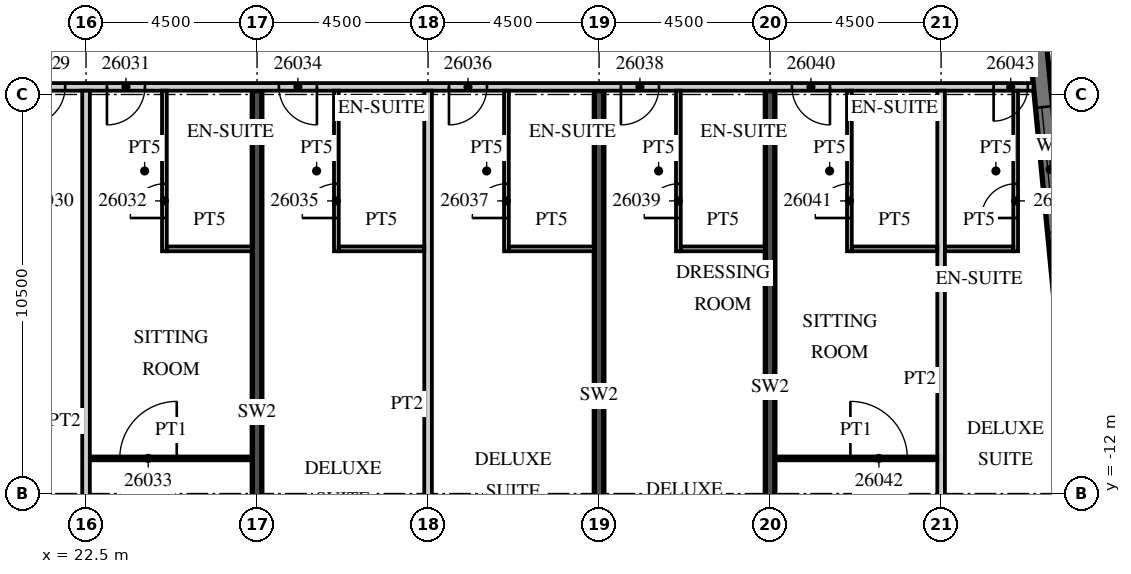
"""IFC4 building model, lengths in metres.
Left out: names, types, materials, properties, quantities, classifications, styles, units other than length and angle.
Written with IfcOpenShell. Run it as: python <this file> out.ifc"""

import sys

from ifc_helpers import new_model, si_unit, direction, frame, frame_2d, origin, place, context, subcontext, project, spatial, rectangle, extrude, element, fill, save


model = new_model("IFC4")
c1 = context("Model", 3, precision=1e-05, world=origin(), true_north=direction((0.0, 1.0)))
c2 = subcontext(c1, "Body", "Model", "MODEL_VIEW")
j1 = project(units=[si_unit("LENGTHUNIT", "METRE"), si_unit("PLANEANGLEUNIT", "RADIAN")], contexts=[c1])
p1 = place(None, origin())
s1 = spatial("IfcSite", under=j1, at=p1, CompositionType="ELEMENT")
p2 = place(p1, origin())
s2 = spatial("IfcBuilding", under=s1, at=p2, CompositionType="ELEMENT")
p3 = place(p2, frame((0.0, 0.0, 120.7)))
s3 = spatial("IfcBuildingStorey", under=s2, at=p3, CompositionType="ELEMENT", Elevation=120.7)
p4 = place(p3, frame((27.0, -18.311, 0.0), z_axis=(0.0, 0.0, 1.0), x_axis=(0.0, 1.0, 0.0)))
e1 = element("IfcWall", 1, at=p4, inside=s3, PredefinedType="SHEAR", context=c2, shape_type="SweptSolid", body=[
    extrude(rectangle(XDim=16.911, YDim=0.25, at=frame_2d((8.455, 0.0))), origin(), (0.0, 0.0, 1.0), 3.3),
])
p5 = place(p3, frame((36.0, -17.444, 0.0), z_axis=(0.0, 0.0, 1.0), x_axis=(0.0, 1.0, 0.0)))
e2 = element("IfcWall", 2, at=p5, inside=s3, PredefinedType="SHEAR", context=c2, shape_type="SweptSolid", body=[
    extrude(rectangle(XDim=16.044, YDim=0.25, at=frame_2d((8.022, 0.0))), origin(), (0.0, 0.0, 1.0), 3.3),
])
p6 = place(p3, frame((40.5, -17.011, 0.0), z_axis=(0.0, 0.0, 1.0), x_axis=(0.0, 1.0, 0.0)))
e3 = element("IfcWall", 3, at=p6, inside=s3, PredefinedType="SHEAR", context=c2, shape_type="SweptSolid", body=[
    extrude(rectangle(XDim=15.611, YDim=0.25, at=frame_2d((7.805, 0.0))), origin(), (0.0, 0.0, 1.0), 3.3),
])
p7 = place(p3, frame((48.753, -12.672, 0.0), z_axis=(0.0, 0.0, 1.0), x_axis=(-0.095842661909, 0.995396495954, 0.0)))
e4 = element("IfcWall", 4, at=p7, inside=s3, PredefinedType="SOLIDWALL", context=c2, shape_type="SweptSolid", body=[
    extrude(rectangle(XDim=35.0, YDim=0.45, at=frame_2d((17.5, 0.0))), origin(), (0.0, 0.0, 1.0), 3.02),
])
p8 = place(p7, frame((3.072, 0.0, 0.45)))
e5 = element("IfcOpeningElement", 5, at=p8, cuts=e4, PredefinedType="OPENING", context=c2, shape_type="SweptSolid", body=[
    extrude(rectangle(XDim=3.3, YDim=2.25, at=frame_2d((1.65, 1.125))), frame((0.0, 0.235, 0.0), z_axis=(0.0, -1.0, 0.0), x_axis=(1.0, 0.0, 0.0)), (0.0, 0.0, 1.0), 0.47),
])
p9 = place(p7, frame((7.593, 0.0, 0.45)))
e6 = element("IfcOpeningElement", 6, at=p9, cuts=e4, PredefinedType="OPENING", context=c2, shape_type="SweptSolid", body=[
    extrude(rectangle(XDim=3.3, YDim=2.25, at=frame_2d((1.65, 1.125))), frame((0.0, 0.235, 0.0), z_axis=(0.0, -1.0, 0.0), x_axis=(1.0, 0.0, 0.0)), (0.0, 0.0, 1.0), 0.47),
])
p10 = place(p3, frame((-13.5, -1.3, 0.0), z_axis=(0.0, 0.0, 1.0), x_axis=(1.0, 0.0, 0.0)))
e7 = element("IfcWall", 7, at=p10, inside=s3, PredefinedType="PARTITIONING", context=c2, shape_type="SweptSolid", body=[
    extrude(rectangle(XDim=60.932, YDim=0.2, at=frame_2d((30.466, 0.0))), origin(), (0.0, 0.0, 1.0), 3.02),
])
p11 = place(p10, frame((2.925, 0.0, 0.0)))
e8 = element("IfcOpeningElement", 8, at=p11, cuts=e7, PredefinedType="OPENING", context=c2, shape_type="SweptSolid", body=[
    extrude(rectangle(XDim=1.0, YDim=2.1, at=frame_2d((0.5, 1.05))), frame((0.0, 0.11, 0.0), z_axis=(0.0, -1.0, 0.0), x_axis=(1.0, 0.0, 0.0)), (0.0, 0.0, 1.0), 0.22),
])
p12 = place(p10, frame((9.863, 0.0, 0.0)))
e9 = element("IfcOpeningElement", 9, at=p12, cuts=e7, PredefinedType="OPENING", context=c2, shape_type="SweptSolid", body=[
    extrude(rectangle(XDim=1.2, YDim=2.1, at=frame_2d((0.6, 1.05))), frame((0.0, 0.11, 0.0), z_axis=(0.0, -1.0, 0.0), x_axis=(1.0, 0.0, 0.0)), (0.0, 0.0, 1.0), 0.22),
])
p13 = place(p10, frame((15.938, 0.0, 0.0)))
e10 = element("IfcOpeningElement", 10, at=p13, cuts=e7, PredefinedType="OPENING", context=c2, shape_type="SweptSolid", body=[
    extrude(rectangle(XDim=1.2, YDim=2.1, at=frame_2d((0.6, 1.05))), frame((0.0, 0.11, 0.0), z_axis=(0.0, -1.0, 0.0), x_axis=(1.0, 0.0, 0.0)), (0.0, 0.0, 1.0), 0.22),
])
p14 = place(p10, frame((27.862, 0.0, 0.0)))
e11 = element("IfcOpeningElement", 11, at=p14, cuts=e7, PredefinedType="OPENING", context=c2, shape_type="SweptSolid", body=[
    extrude(rectangle(XDim=1.2, YDim=2.1, at=frame_2d((0.6, 1.05))), frame((0.0, 0.11, 0.0), z_axis=(0.0, -1.0, 0.0), x_axis=(1.0, 0.0, 0.0)), (0.0, 0.0, 1.0), 0.22),
])
p15 = place(p10, frame((34.45, 0.0, 0.0)))
e12 = element("IfcOpeningElement", 12, at=p15, cuts=e7, PredefinedType="OPENING", context=c2, shape_type="SweptSolid", body=[
    extrude(rectangle(XDim=1.0, YDim=2.1, at=frame_2d((0.5, 1.05))), frame((0.0, 0.11, 0.0), z_axis=(0.0, -1.0, 0.0), x_axis=(1.0, 0.0, 0.0)), (0.0, 0.0, 1.0), 0.22),
])
p16 = place(p10, frame((36.55, 0.0, 0.0)))
e13 = element("IfcOpeningElement", 13, at=p16, cuts=e7, PredefinedType="OPENING", context=c2, shape_type="SweptSolid", body=[
    extrude(rectangle(XDim=1.0, YDim=2.1, at=frame_2d((0.5, 1.05))), frame((0.0, 0.11, 0.0), z_axis=(0.0, -1.0, 0.0), x_axis=(1.0, 0.0, 0.0)), (0.0, 0.0, 1.0), 0.22),
])
p17 = place(p10, frame((41.075, 0.0, 0.0)))
e14 = element("IfcOpeningElement", 14, at=p17, cuts=e7, PredefinedType="OPENING", context=c2, shape_type="SweptSolid", body=[
    extrude(rectangle(XDim=1.0, YDim=2.1, at=frame_2d((0.5, 1.05))), frame((0.0, 0.11, 0.0), z_axis=(0.0, -1.0, 0.0), x_axis=(1.0, 0.0, 0.0)), (0.0, 0.0, 1.0), 0.22),
])
p18 = place(p10, frame((45.55, 0.0, 0.0)))
e15 = element("IfcOpeningElement", 15, at=p18, cuts=e7, PredefinedType="OPENING", context=c2, shape_type="SweptSolid", body=[
    extrude(rectangle(XDim=1.0, YDim=2.1, at=frame_2d((0.5, 1.05))), frame((0.0, 0.11, 0.0), z_axis=(0.0, -1.0, 0.0), x_axis=(1.0, 0.0, 0.0)), (0.0, 0.0, 1.0), 0.22),
])
p19 = place(p10, frame((50.075, 0.0, 0.0)))
e16 = element("IfcOpeningElement", 16, at=p19, cuts=e7, PredefinedType="OPENING", context=c2, shape_type="SweptSolid", body=[
    extrude(rectangle(XDim=1.0, YDim=2.1, at=frame_2d((0.5, 1.05))), frame((0.0, 0.11, 0.0), z_axis=(0.0, -1.0, 0.0), x_axis=(1.0, 0.0, 0.0)), (0.0, 0.0, 1.0), 0.22),
])
p20 = place(p10, frame((54.575, 0.0, 0.0)))
e17 = element("IfcOpeningElement", 17, at=p20, cuts=e7, PredefinedType="OPENING", context=c2, shape_type="SweptSolid", body=[
    extrude(rectangle(XDim=1.0, YDim=2.1, at=frame_2d((0.5, 1.05))), frame((0.0, 0.11, 0.0), z_axis=(0.0, -1.0, 0.0), x_axis=(1.0, 0.0, 0.0)), (0.0, 0.0, 1.0), 0.22),
])
p21 = place(p10, frame((59.882, 0.0, 0.0)))
e18 = element("IfcOpeningElement", 18, at=p21, cuts=e7, PredefinedType="OPENING", context=c2, shape_type="SweptSolid", body=[
    extrude(rectangle(XDim=0.9, YDim=2.1, at=frame_2d((0.45, 1.05))), frame((0.0, 0.11, 0.0), z_axis=(0.0, -1.0, 0.0), x_axis=(1.0, 0.0, 0.0)), (0.0, 0.0, 1.0), 0.22),
])
p22 = place(p3, frame((22.5, -18.766, 0.0), z_axis=(0.0, 0.0, 1.0), x_axis=(0.0, 1.0, 0.0)))
e19 = element("IfcWall", 19, at=p22, inside=s3, PredefinedType="PARTITIONING", context=c2, shape_type="SweptSolid", body=[
    extrude(rectangle(XDim=17.366, YDim=0.2, at=frame_2d((8.683, 0.0))), origin(), (0.0, 0.0, 1.0), 3.02),
])
p23 = place(p3, frame((24.562, -5.625, 0.0), z_axis=(0.0, 0.0, 1.0), x_axis=(0.0, 1.0, 0.0)))
e20 = element("IfcWall", 20, at=p23, inside=s3, PredefinedType="PARTITIONING", context=c2, shape_type="SweptSolid", body=[
    extrude(rectangle(XDim=4.225, YDim=0.125, at=frame_2d((2.113, 0.0))), origin(), (0.0, 0.0, 1.0), 3.02),
])
p24 = place(p23, frame((0.875, 0.0, 0.0)))
e21 = element("IfcOpeningElement", 21, at=p24, cuts=e20, PredefinedType="OPENING", context=c2, shape_type="SweptSolid", body=[
    extrude(rectangle(XDim=0.9, YDim=2.1, at=frame_2d((0.45, 1.05))), frame((0.0, 0.073, 0.0), z_axis=(0.0, -1.0, 0.0), x_axis=(1.0, 0.0, 0.0)), (0.0, 0.0, 1.0), 0.145),
])
p25 = place(p3, frame((24.625, -5.562, 0.0), z_axis=(0.0, 0.0, 1.0), x_axis=(1.0, 0.0, 0.0)))
e22 = element("IfcWall", 22, at=p25, inside=s3, PredefinedType="PARTITIONING", context=c2, shape_type="SweptSolid", body=[
    extrude(rectangle(XDim=2.25, YDim=0.125, at=frame_2d((1.125, 0.0))), origin(), (0.0, 0.0, 1.0), 3.02),
])
p26 = place(p3, frame((22.6, -11.075, 0.0), z_axis=(0.0, 0.0, 1.0), x_axis=(1.0, 0.0, 0.0)))
e23 = element("IfcWall", 23, at=p26, inside=s3, PredefinedType="PARTITIONING", context=c2, shape_type="SweptSolid", body=[
    extrude(rectangle(XDim=4.275, YDim=0.1, at=frame_2d((2.137, 0.0))), origin(), (0.0, 0.0, 1.0), 3.02),
])
p27 = place(p26, frame((0.787, 0.0, 0.0)))
e24 = element("IfcOpeningElement", 24, at=p27, cuts=e23, PredefinedType="OPENING", context=c2, shape_type="SweptSolid", body=[
    extrude(rectangle(XDim=1.5, YDim=2.1, at=frame_2d((0.75, 1.05))), frame((0.0, 0.06, 0.0), z_axis=(0.0, -1.0, 0.0), x_axis=(1.0, 0.0, 0.0)), (0.0, 0.0, 1.0), 0.12),
])
p28 = place(p3, frame((31.5, -17.899, 0.0), z_axis=(0.0, 0.0, 1.0), x_axis=(0.0, 1.0, 0.0)))
e25 = element("IfcWall", 25, at=p28, inside=s3, PredefinedType="PARTITIONING", context=c2, shape_type="SweptSolid", body=[
    extrude(rectangle(XDim=16.499, YDim=0.2, at=frame_2d((8.25, 0.0))), origin(), (0.0, 0.0, 1.0), 3.02),
])
p29 = place(p3, frame((29.087, -5.625, 0.0), z_axis=(0.0, 0.0, 1.0), x_axis=(0.0, 1.0, 0.0)))
e26 = element("IfcWall", 26, at=p29, inside=s3, PredefinedType="PARTITIONING", context=c2, shape_type="SweptSolid", body=[
    extrude(rectangle(XDim=4.225, YDim=0.125, at=frame_2d((2.113, 0.0))), origin(), (0.0, 0.0, 1.0), 3.02),
])
p30 = place(p29, frame((0.875, 0.0, 0.0)))
e27 = element("IfcOpeningElement", 27, at=p30, cuts=e26, PredefinedType="OPENING", context=c2, shape_type="SweptSolid", body=[
    extrude(rectangle(XDim=0.9, YDim=2.1, at=frame_2d((0.45, 1.05))), frame((0.0, 0.073, 0.0), z_axis=(0.0, -1.0, 0.0), x_axis=(1.0, 0.0, 0.0)), (0.0, 0.0, 1.0), 0.145),
])
p31 = place(p3, frame((29.15, -5.562, 0.0), z_axis=(0.0, 0.0, 1.0), x_axis=(1.0, 0.0, 0.0)))
e28 = element("IfcWall", 28, at=p31, inside=s3, PredefinedType="PARTITIONING", context=c2, shape_type="SweptSolid", body=[
    extrude(rectangle(XDim=2.25, YDim=0.125, at=frame_2d((1.125, 0.0))), origin(), (0.0, 0.0, 1.0), 3.02),
])
p32 = place(p3, frame((33.562, -5.625, 0.0), z_axis=(0.0, 0.0, 1.0), x_axis=(0.0, 1.0, 0.0)))
e29 = element("IfcWall", 29, at=p32, inside=s3, PredefinedType="PARTITIONING", context=c2, shape_type="SweptSolid", body=[
    extrude(rectangle(XDim=4.225, YDim=0.125, at=frame_2d((2.113, 0.0))), origin(), (0.0, 0.0, 1.0), 3.02),
])
p33 = place(p32, frame((0.875, 0.0, 0.0)))
e30 = element("IfcOpeningElement", 30, at=p33, cuts=e29, PredefinedType="OPENING", context=c2, shape_type="SweptSolid", body=[
    extrude(rectangle(XDim=0.9, YDim=2.1, at=frame_2d((0.45, 1.05))), frame((0.0, 0.073, 0.0), z_axis=(0.0, -1.0, 0.0), x_axis=(1.0, 0.0, 0.0)), (0.0, 0.0, 1.0), 0.145),
])
p34 = place(p3, frame((33.625, -5.562, 0.0), z_axis=(0.0, 0.0, 1.0), x_axis=(1.0, 0.0, 0.0)))
e31 = element("IfcWall", 31, at=p34, inside=s3, PredefinedType="PARTITIONING", context=c2, shape_type="SweptSolid", body=[
    extrude(rectangle(XDim=2.25, YDim=0.125, at=frame_2d((1.125, 0.0))), origin(), (0.0, 0.0, 1.0), 3.02),
])
p35 = place(p3, frame((38.087, -5.625, 0.0), z_axis=(0.0, 0.0, 1.0), x_axis=(0.0, 1.0, 0.0)))
e32 = element("IfcWall", 32, at=p35, inside=s3, PredefinedType="PARTITIONING", context=c2, shape_type="SweptSolid", body=[
    extrude(rectangle(XDim=4.225, YDim=0.125, at=frame_2d((2.113, 0.0))), origin(), (0.0, 0.0, 1.0), 3.02),
])
p36 = place(p35, frame((0.875, 0.0, 0.0)))
e33 = element("IfcOpeningElement", 33, at=p36, cuts=e32, PredefinedType="OPENING", context=c2, shape_type="SweptSolid", body=[
    extrude(rectangle(XDim=0.9, YDim=2.1, at=frame_2d((0.45, 1.05))), frame((0.0, 0.073, 0.0), z_axis=(0.0, -1.0, 0.0), x_axis=(1.0, 0.0, 0.0)), (0.0, 0.0, 1.0), 0.145),
])
p37 = place(p3, frame((38.15, -5.562, 0.0), z_axis=(0.0, 0.0, 1.0), x_axis=(1.0, 0.0, 0.0)))
e34 = element("IfcWall", 34, at=p37, inside=s3, PredefinedType="PARTITIONING", context=c2, shape_type="SweptSolid", body=[
    extrude(rectangle(XDim=2.225, YDim=0.125, at=frame_2d((1.113, 0.0))), origin(), (0.0, 0.0, 1.0), 3.02),
])
p38 = place(p3, frame((45.0, -16.599, 0.0), z_axis=(0.0, 0.0, 1.0), x_axis=(0.0, 1.0, 0.0)))
e35 = element("IfcWall", 35, at=p38, inside=s3, PredefinedType="PARTITIONING", context=c2, shape_type="SweptSolid", body=[
    extrude(rectangle(XDim=15.199, YDim=0.2, at=frame_2d((7.6, 0.0))), origin(), (0.0, 0.0, 1.0), 3.02),
])
p39 = place(p3, frame((42.587, -5.625, 0.0), z_axis=(0.0, 0.0, 1.0), x_axis=(0.0, 1.0, 0.0)))
e36 = element("IfcWall", 36, at=p39, inside=s3, PredefinedType="PARTITIONING", context=c2, shape_type="SweptSolid", body=[
    extrude(rectangle(XDim=4.225, YDim=0.125, at=frame_2d((2.113, 0.0))), origin(), (0.0, 0.0, 1.0), 3.02),
])
p40 = place(p39, frame((0.875, 0.0, 0.0)))
e37 = element("IfcOpeningElement", 37, at=p40, cuts=e36, PredefinedType="OPENING", context=c2, shape_type="SweptSolid", body=[
    extrude(rectangle(XDim=0.9, YDim=2.1, at=frame_2d((0.45, 1.05))), frame((0.0, 0.073, 0.0), z_axis=(0.0, -1.0, 0.0), x_axis=(1.0, 0.0, 0.0)), (0.0, 0.0, 1.0), 0.145),
])
p41 = place(p3, frame((42.65, -5.562, 0.0), z_axis=(0.0, 0.0, 1.0), x_axis=(1.0, 0.0, 0.0)))
e38 = element("IfcWall", 38, at=p41, inside=s3, PredefinedType="PARTITIONING", context=c2, shape_type="SweptSolid", body=[
    extrude(rectangle(XDim=2.25, YDim=0.125, at=frame_2d((1.125, 0.0))), origin(), (0.0, 0.0, 1.0), 3.02),
])
p42 = place(p3, frame((40.625, -11.075, 0.0), z_axis=(0.0, 0.0, 1.0), x_axis=(1.0, 0.0, 0.0)))
e39 = element("IfcWall", 39, at=p42, inside=s3, PredefinedType="PARTITIONING", context=c2, shape_type="SweptSolid", body=[
    extrude(rectangle(XDim=4.275, YDim=0.1, at=frame_2d((2.137, 0.0))), origin(), (0.0, 0.0, 1.0), 3.02),
])
p43 = place(p42, frame((1.988, 0.0, 0.0)))
e40 = element("IfcOpeningElement", 40, at=p43, cuts=e39, PredefinedType="OPENING", context=c2, shape_type="SweptSolid", body=[
    extrude(rectangle(XDim=1.5, YDim=2.1, at=frame_2d((0.75, 1.05))), frame((0.0, 0.06, 0.0), z_axis=(0.0, -1.0, 0.0), x_axis=(1.0, 0.0, 0.0)), (0.0, 0.0, 1.0), 0.12),
])
p44 = place(p3, frame((46.962, -5.625, 0.0), z_axis=(0.0, 0.0, 1.0), x_axis=(0.0, 1.0, 0.0)))
e41 = element("IfcWall", 41, at=p44, inside=s3, PredefinedType="PARTITIONING", context=c2, shape_type="SweptSolid", body=[
    extrude(rectangle(XDim=4.225, YDim=0.125, at=frame_2d((2.113, 0.0))), origin(), (0.0, 0.0, 1.0), 3.02),
])
p45 = place(p44, frame((0.875, 0.0, 0.0)))
e42 = element("IfcOpeningElement", 42, at=p45, cuts=e41, PredefinedType="OPENING", context=c2, shape_type="SweptSolid", body=[
    extrude(rectangle(XDim=0.9, YDim=2.1, at=frame_2d((0.45, 1.05))), frame((0.0, 0.073, 0.0), z_axis=(0.0, -1.0, 0.0), x_axis=(1.0, 0.0, 0.0)), (0.0, 0.0, 1.0), 0.145),
])
p46 = place(p3, frame((45.1, -5.562, 0.0), z_axis=(0.0, 0.0, 1.0), x_axis=(1.0, 0.0, 0.0)))
e43 = element("IfcWall", 43, at=p46, inside=s3, PredefinedType="PARTITIONING", context=c2, shape_type="SweptSolid", body=[
    extrude(rectangle(XDim=1.8, YDim=0.125, at=frame_2d((0.9, 0.0))), origin(), (0.0, 0.0, 1.0), 3.02),
])
p47 = place(p9, origin())
e44 = element("IfcWindow", 44, at=p47, inside=s3, PartitioningType="SINGLE_PANEL", PredefinedType="WINDOW", context=c2, shape_type="SweptSolid", body=[
    extrude(rectangle(XDim=3.3, YDim=2.25, at=frame_2d((1.65, 1.125))), frame((0.0, 0.09, 0.0), z_axis=(0.0, -1.0, 0.0), x_axis=(1.0, 0.0, 0.0)), (0.0, 0.0, 1.0), 0.06),
])
fill(e6, e44)
p48 = place(p15, origin())
e45 = element("IfcDoor", 45, at=p48, inside=s3, OperationType="SINGLE_SWING_LEFT", PredefinedType="DOOR", context=c2, shape_type="SweptSolid", body=[
    extrude(rectangle(XDim=1.0, YDim=2.1, at=frame_2d((0.5, 1.05))), frame((0.0, 0.025, 0.0), z_axis=(0.0, -1.0, 0.0), x_axis=(1.0, 0.0, 0.0)), (0.0, 0.0, 1.0), 0.05),
])
fill(e12, e45)
p49 = place(p16, origin())
e46 = element("IfcDoor", 46, at=p49, inside=s3, OperationType="SINGLE_SWING_LEFT", PredefinedType="DOOR", context=c2, shape_type="SweptSolid", body=[
    extrude(rectangle(XDim=1.0, YDim=2.1, at=frame_2d((0.5, 1.05))), frame((0.0, 0.025, 0.0), z_axis=(0.0, -1.0, 0.0), x_axis=(1.0, 0.0, 0.0)), (0.0, 0.0, 1.0), 0.05),
])
fill(e13, e46)
p50 = place(p24, origin())
e47 = element("IfcDoor", 47, at=p50, inside=s3, OperationType="SINGLE_SWING_LEFT", PredefinedType="DOOR", context=c2, shape_type="SweptSolid", body=[
    extrude(rectangle(XDim=0.9, YDim=2.1, at=frame_2d((0.45, 1.05))), frame((0.0, 0.025, 0.0), z_axis=(0.0, -1.0, 0.0), x_axis=(1.0, 0.0, 0.0)), (0.0, 0.0, 1.0), 0.05),
])
fill(e21, e47)
p51 = place(p27, origin())
e48 = element("IfcDoor", 48, at=p51, inside=s3, OperationType="SINGLE_SWING_RIGHT", PredefinedType="DOOR", context=c2, shape_type="SweptSolid", body=[
    extrude(rectangle(XDim=1.5, YDim=2.1, at=frame_2d((0.75, 1.05))), frame((0.0, 0.025, 0.0), z_axis=(0.0, -1.0, 0.0), x_axis=(1.0, 0.0, 0.0)), (0.0, 0.0, 1.0), 0.05),
])
fill(e24, e48)
p52 = place(p17, origin())
e49 = element("IfcDoor", 49, at=p52, inside=s3, OperationType="SINGLE_SWING_RIGHT", PredefinedType="DOOR", context=c2, shape_type="SweptSolid", body=[
    extrude(rectangle(XDim=1.0, YDim=2.1, at=frame_2d((0.5, 1.05))), frame((0.0, 0.025, 0.0), z_axis=(0.0, -1.0, 0.0), x_axis=(1.0, 0.0, 0.0)), (0.0, 0.0, 1.0), 0.05),
])
fill(e14, e49)
p53 = place(p30, origin())
e50 = element("IfcDoor", 50, at=p53, inside=s3, OperationType="SINGLE_SWING_LEFT", PredefinedType="DOOR", context=c2, shape_type="SweptSolid", body=[
    extrude(rectangle(XDim=0.9, YDim=2.1, at=frame_2d((0.45, 1.05))), frame((0.0, 0.025, 0.0), z_axis=(0.0, -1.0, 0.0), x_axis=(1.0, 0.0, 0.0)), (0.0, 0.0, 1.0), 0.05),
])
fill(e27, e50)
p54 = place(p18, origin())
e51 = element("IfcDoor", 51, at=p54, inside=s3, OperationType="SINGLE_SWING_LEFT", PredefinedType="DOOR", context=c2, shape_type="SweptSolid", body=[
    extrude(rectangle(XDim=1.0, YDim=2.1, at=frame_2d((0.5, 1.05))), frame((0.0, 0.025, 0.0), z_axis=(0.0, -1.0, 0.0), x_axis=(1.0, 0.0, 0.0)), (0.0, 0.0, 1.0), 0.05),
])
fill(e15, e51)
p55 = place(p33, origin())
e52 = element("IfcDoor", 52, at=p55, inside=s3, OperationType="SINGLE_SWING_LEFT", PredefinedType="DOOR", context=c2, shape_type="SweptSolid", body=[
    extrude(rectangle(XDim=0.9, YDim=2.1, at=frame_2d((0.45, 1.05))), frame((0.0, 0.025, 0.0), z_axis=(0.0, -1.0, 0.0), x_axis=(1.0, 0.0, 0.0)), (0.0, 0.0, 1.0), 0.05),
])
fill(e30, e52)
p56 = place(p19, origin())
e53 = element("IfcDoor", 53, at=p56, inside=s3, OperationType="SINGLE_SWING_LEFT", PredefinedType="DOOR", context=c2, shape_type="SweptSolid", body=[
    extrude(rectangle(XDim=1.0, YDim=2.1, at=frame_2d((0.5, 1.05))), frame((0.0, 0.025, 0.0), z_axis=(0.0, -1.0, 0.0), x_axis=(1.0, 0.0, 0.0)), (0.0, 0.0, 1.0), 0.05),
])
fill(e16, e53)
p57 = place(p36, origin())
e54 = element("IfcDoor", 54, at=p57, inside=s3, OperationType="SINGLE_SWING_LEFT", PredefinedType="DOOR", context=c2, shape_type="SweptSolid", body=[
    extrude(rectangle(XDim=0.9, YDim=2.1, at=frame_2d((0.45, 1.05))), frame((0.0, 0.025, 0.0), z_axis=(0.0, -1.0, 0.0), x_axis=(1.0, 0.0, 0.0)), (0.0, 0.0, 1.0), 0.05),
])
fill(e33, e54)
p58 = place(p20, origin())
e55 = element("IfcDoor", 55, at=p58, inside=s3, OperationType="SINGLE_SWING_RIGHT", PredefinedType="DOOR", context=c2, shape_type="SweptSolid", body=[
    extrude(rectangle(XDim=1.0, YDim=2.1, at=frame_2d((0.5, 1.05))), frame((0.0, 0.025, 0.0), z_axis=(0.0, -1.0, 0.0), x_axis=(1.0, 0.0, 0.0)), (0.0, 0.0, 1.0), 0.05),
])
fill(e17, e55)
p59 = place(p40, origin())
e56 = element("IfcDoor", 56, at=p59, inside=s3, OperationType="SINGLE_SWING_LEFT", PredefinedType="DOOR", context=c2, shape_type="SweptSolid", body=[
    extrude(rectangle(XDim=0.9, YDim=2.1, at=frame_2d((0.45, 1.05))), frame((0.0, 0.025, 0.0), z_axis=(0.0, -1.0, 0.0), x_axis=(1.0, 0.0, 0.0)), (0.0, 0.0, 1.0), 0.05),
])
fill(e37, e56)
p60 = place(p43, origin())
e57 = element("IfcDoor", 57, at=p60, inside=s3, OperationType="SINGLE_SWING_LEFT", PredefinedType="DOOR", context=c2, shape_type="SweptSolid", body=[
    extrude(rectangle(XDim=1.5, YDim=2.1, at=frame_2d((0.75, 1.05))), frame((0.0, 0.025, 0.0), z_axis=(0.0, -1.0, 0.0), x_axis=(1.0, 0.0, 0.0)), (0.0, 0.0, 1.0), 0.05),
])
fill(e40, e57)
p61 = place(p21, origin())
e58 = element("IfcDoor", 58, at=p61, inside=s3, OperationType="SINGLE_SWING_LEFT", PredefinedType="DOOR", context=c2, shape_type="SweptSolid", body=[
    extrude(rectangle(XDim=0.9, YDim=2.1, at=frame_2d((0.45, 1.05))), frame((0.0, 0.025, 0.0), z_axis=(0.0, -1.0, 0.0), x_axis=(1.0, 0.0, 0.0)), (0.0, 0.0, 1.0), 0.05),
])
fill(e18, e58)
p62 = place(p45, origin())
e59 = element("IfcDoor", 59, at=p62, inside=s3, OperationType="SINGLE_SWING_LEFT", PredefinedType="DOOR", context=c2, shape_type="SweptSolid", body=[
    extrude(rectangle(XDim=0.9, YDim=2.1, at=frame_2d((0.45, 1.05))), frame((0.0, 0.025, 0.0), z_axis=(0.0, -1.0, 0.0), x_axis=(1.0, 0.0, 0.0)), (0.0, 0.0, 1.0), 0.05),
])
fill(e42, e59)
save(model, sys.argv[1])
